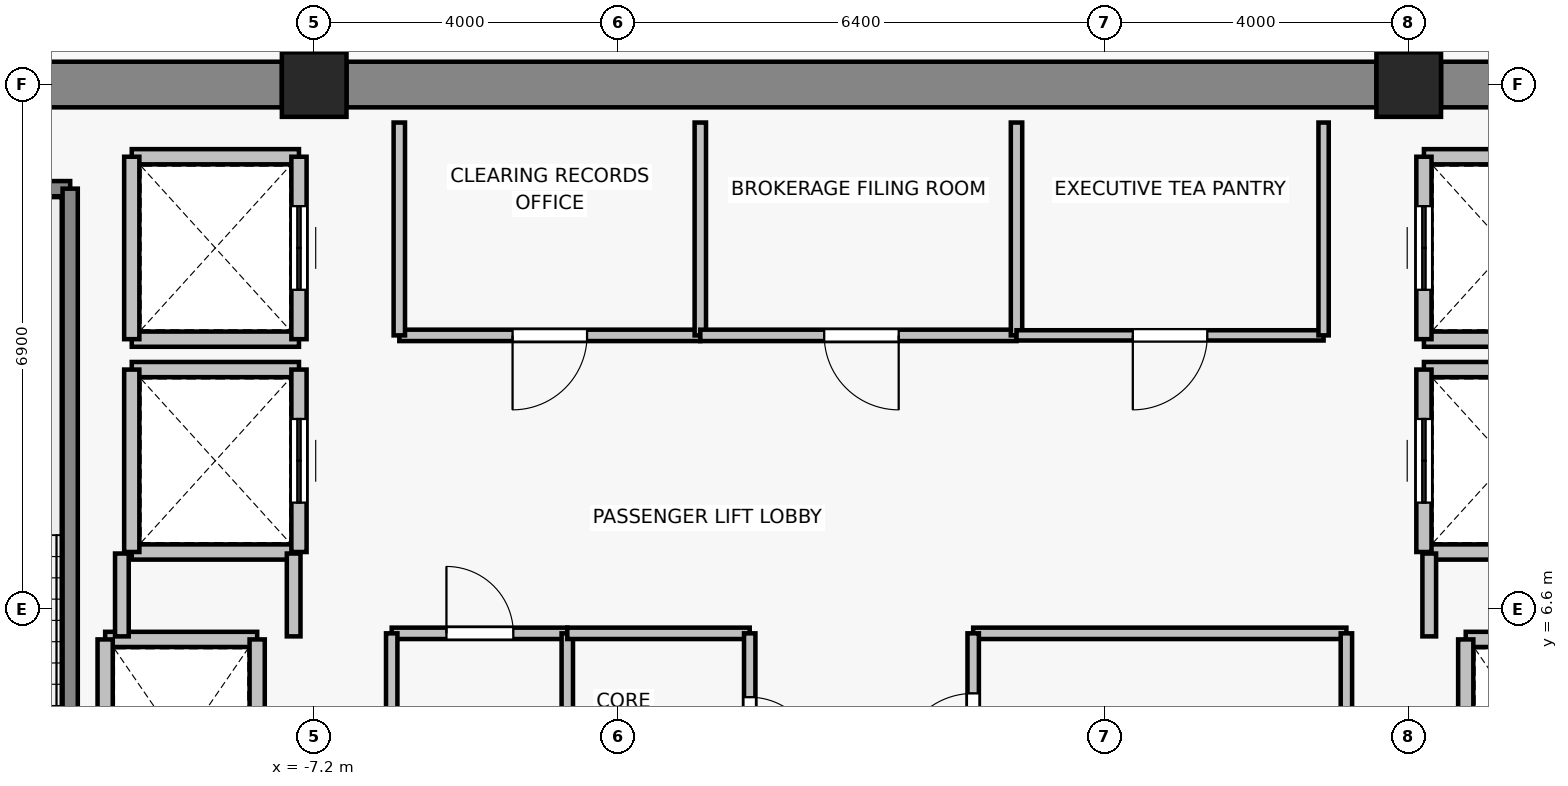
"""IFC4 building model, lengths in metres.
Left out: names, types, materials, properties, quantities, classifications, styles, units other than length and angle.
Written with IfcOpenShell. Run it as: python <this file> out.ifc"""

import sys

from ifc_helpers import new_model, si_unit, direction, frame, frame_2d, origin, origin_2d, place, context, subcontext, project, spatial, rectangle, extrude, source, transform, mapped, element, fill, save


model = new_model("IFC4")
c1 = context("Model", 3, precision=1e-05, world=origin(), true_north=direction((0.0, 1.0)))
c2 = subcontext(c1, "Body", "Model", "MODEL_VIEW")
j1 = project(units=[si_unit("LENGTHUNIT", "METRE"), si_unit("PLANEANGLEUNIT", "RADIAN")], contexts=[c1])
p1 = place(None, origin())
s1 = spatial("IfcSite", under=j1, at=p1, CompositionType="ELEMENT")
p2 = place(p1, origin())
s2 = spatial("IfcBuilding", under=s1, at=p2, CompositionType="ELEMENT")
p3 = place(p2, frame((0.0, 0.0, 261.7)))
s3 = spatial("IfcBuildingStorey", under=s2, at=p3, CompositionType="ELEMENT", Elevation=261.7)
for number, where, z_axis, x_axis in (
    (1, (-7.2, 13.5, 0.0), (0.0, 0.0, 1.0), (1.0, 0.0, 0.0)),
    (2, (7.2, 13.5, 0.0), (0.0, 0.0, 1.0), (1.0, 0.0, 0.0)),
):
    element("IfcColumn", number, at=place(p3, frame(where, z_axis=z_axis, x_axis=x_axis)), inside=s3, PredefinedType="COLUMN", context=c2, shape_type="SweptSolid", body=[
        extrude(rectangle(XDim=0.85, YDim=0.85, at=origin_2d()), origin(), (0.0, 0.0, 1.0), 3.3),
    ])
p4 = place(p3, frame((-13.975, 13.5, 0.0), z_axis=(0.0, 0.0, 1.0), x_axis=(1.0, 0.0, 0.0)))
e3 = element("IfcWall", 3, at=p4, inside=s3, PredefinedType="SHEAR", context=c2, shape_type="SweptSolid", body=[
    extrude(rectangle(XDim=6.35, YDim=0.6, at=frame_2d((3.175, 0.0))), origin(), (0.0, 0.0, 1.0), 3.075),
])
p5 = place(p3, frame((-6.775, 13.5, 0.0), z_axis=(0.0, 0.0, 1.0), x_axis=(1.0, 0.0, 0.0)))
e4 = element("IfcWall", 4, at=p5, inside=s3, PredefinedType="SHEAR", context=c2, shape_type="SweptSolid", body=[
    extrude(rectangle(XDim=13.55, YDim=0.6, at=frame_2d((6.775, 0.0))), origin(), (0.0, 0.0, 1.0), 3.075),
])
p6 = place(p3, frame((7.625, 13.5, 0.0), z_axis=(0.0, 0.0, 1.0), x_axis=(1.0, 0.0, 0.0)))
e5 = element("IfcWall", 5, at=p6, inside=s3, PredefinedType="SHEAR", context=c2, shape_type="SweptSolid", body=[
    extrude(rectangle(XDim=6.35, YDim=0.6, at=frame_2d((3.175, 0.0))), origin(), (0.0, 0.0, 1.0), 3.075),
])
p7 = place(p3, frame((-9.95, 6.2, 0.0), z_axis=(0.0, 0.0, 1.0), x_axis=(1.0, 0.0, 0.0)))
e6 = element("IfcWall", 6, at=p7, inside=s3, PredefinedType="SOLIDWALL", context=c2, shape_type="SweptSolid", body=[
    extrude(rectangle(XDim=2.0, YDim=0.2, at=frame_2d((1.0, 0.0))), origin(), (0.0, 0.0, 1.0), 3.075),
])
for number, where, z_axis, x_axis in (
    (7, (-9.95, 3.4, 0.0), (0.0, 0.0, 1.0), (0.0, 1.0, 0.0)),
    (8, (-7.95, 6.2, 0.0), (0.0, 0.0, 1.0), (0.0, -1.0, 0.0)),
):
    element("IfcWall", number, at=place(p3, frame(where, z_axis=z_axis, x_axis=x_axis)), inside=s3, PredefinedType="SOLIDWALL", context=c2, shape_type="SweptSolid", body=[
        extrude(rectangle(XDim=2.8, YDim=0.2, at=frame_2d((1.4, 0.0))), origin(), (0.0, 0.0, 1.0), 3.075),
    ])
p8 = place(p3, frame((7.95, 6.2, 0.0), z_axis=(0.0, 0.0, 1.0), x_axis=(1.0, 0.0, 0.0)))
e9 = element("IfcWall", 9, at=p8, inside=s3, PredefinedType="SOLIDWALL", context=c2, shape_type="SweptSolid", body=[
    extrude(rectangle(XDim=2.0, YDim=0.2, at=frame_2d((1.0, 0.0))), origin(), (0.0, 0.0, 1.0), 3.075),
])
p9 = place(p3, frame((7.95, 3.4, 0.0), z_axis=(0.0, 0.0, 1.0), x_axis=(0.0, 1.0, 0.0)))
e10 = element("IfcWall", 10, at=p9, inside=s3, PredefinedType="SOLIDWALL", context=c2, shape_type="SweptSolid", body=[
    extrude(rectangle(XDim=2.8, YDim=0.2, at=frame_2d((1.4, 0.0))), origin(), (0.0, 0.0, 1.0), 3.075),
])
for number, where, z_axis, x_axis in (
    (11, (-7.4, 7.35, 0.0), (0.0, 0.0, 1.0), (-1.0, 0.0, 0.0)),
    (12, (-9.6, 9.75, 0.0), (0.0, 0.0, 1.0), (1.0, 0.0, 0.0)),
):
    element("IfcWall", number, at=place(p3, frame(where, z_axis=z_axis, x_axis=x_axis)), inside=s3, PredefinedType="SOLIDWALL", context=c2, shape_type="SweptSolid", body=[
        extrude(rectangle(XDim=2.2, YDim=0.2, at=frame_2d((1.1, 0.0))), origin(), (0.0, 0.0, 1.0), 2.615),
    ])
p10 = place(p3, frame((-9.6, 7.35, 0.0), z_axis=(0.0, 0.0, 1.0), x_axis=(0.0, 1.0, 0.0)))
e13 = element("IfcWall", 13, at=p10, inside=s3, PredefinedType="SOLIDWALL", context=c2, shape_type="SweptSolid", body=[
    extrude(rectangle(XDim=2.4, YDim=0.2, at=frame_2d((1.2, 0.0))), origin(), (0.0, 0.0, 1.0), 3.075),
])
p11 = place(p3, frame((-7.4, 9.75, 0.0), z_axis=(0.0, 0.0, 1.0), x_axis=(0.0, -1.0, 0.0)))
e14 = element("IfcWall", 14, at=p11, inside=s3, PredefinedType="SOLIDWALL", context=c2, shape_type="SweptSolid", body=[
    extrude(rectangle(XDim=2.4, YDim=0.2, at=frame_2d((1.2, 0.0))), origin(), (0.0, 0.0, 1.0), 2.615),
])
p12 = place(p11, frame((0.65, 0.0, 0.0)))
e15 = element("IfcOpeningElement", 15, at=p12, cuts=e14, PredefinedType="OPENING", context=c2, shape_type="SweptSolid", body=[
    extrude(rectangle(XDim=1.1, YDim=2.2, at=frame_2d((0.55, 1.1))), frame((0.0, 0.11, 0.0), z_axis=(0.0, -1.0, 0.0), x_axis=(1.0, 0.0, 0.0)), (0.0, 0.0, 1.0), 0.22),
])
for number, where, z_axis, x_axis in (
    (16, (-7.4, 10.15, 0.0), (0.0, 0.0, 1.0), (-1.0, 0.0, 0.0)),
    (17, (-9.6, 12.55, 0.0), (0.0, 0.0, 1.0), (1.0, 0.0, 0.0)),
):
    element("IfcWall", number, at=place(p3, frame(where, z_axis=z_axis, x_axis=x_axis)), inside=s3, PredefinedType="SOLIDWALL", context=c2, shape_type="SweptSolid", body=[
        extrude(rectangle(XDim=2.2, YDim=0.2, at=frame_2d((1.1, 0.0))), origin(), (0.0, 0.0, 1.0), 2.615),
    ])
p13 = place(p3, frame((-9.6, 10.15, 0.0), z_axis=(0.0, 0.0, 1.0), x_axis=(0.0, 1.0, 0.0)))
e18 = element("IfcWall", 18, at=p13, inside=s3, PredefinedType="SOLIDWALL", context=c2, shape_type="SweptSolid", body=[
    extrude(rectangle(XDim=2.4, YDim=0.2, at=frame_2d((1.2, 0.0))), origin(), (0.0, 0.0, 1.0), 3.075),
])
p14 = place(p3, frame((-7.4, 12.55, 0.0), z_axis=(0.0, 0.0, 1.0), x_axis=(0.0, -1.0, 0.0)))
e19 = element("IfcWall", 19, at=p14, inside=s3, PredefinedType="SOLIDWALL", context=c2, shape_type="SweptSolid", body=[
    extrude(rectangle(XDim=2.4, YDim=0.2, at=frame_2d((1.2, 0.0))), origin(), (0.0, 0.0, 1.0), 2.615),
])
p15 = place(p14, frame((0.65, 0.0, 0.0)))
e20 = element("IfcOpeningElement", 20, at=p15, cuts=e19, PredefinedType="OPENING", context=c2, shape_type="SweptSolid", body=[
    extrude(rectangle(XDim=1.1, YDim=2.2, at=frame_2d((0.55, 1.1))), frame((0.0, 0.11, 0.0), z_axis=(0.0, -1.0, 0.0), x_axis=(1.0, 0.0, 0.0)), (0.0, 0.0, 1.0), 0.22),
])
for number, where, z_axis, x_axis in (
    (21, (9.6, 7.35, 0.0), (0.0, 0.0, 1.0), (-1.0, 0.0, 0.0)),
    (22, (7.4, 9.75, 0.0), (0.0, 0.0, 1.0), (1.0, 0.0, 0.0)),
):
    element("IfcWall", number, at=place(p3, frame(where, z_axis=z_axis, x_axis=x_axis)), inside=s3, PredefinedType="SOLIDWALL", context=c2, shape_type="SweptSolid", body=[
        extrude(rectangle(XDim=2.2, YDim=0.2, at=frame_2d((1.1, 0.0))), origin(), (0.0, 0.0, 1.0), 2.615),
    ])
p16 = place(p3, frame((7.4, 7.35, 0.0), z_axis=(0.0, 0.0, 1.0), x_axis=(0.0, 1.0, 0.0)))
e23 = element("IfcWall", 23, at=p16, inside=s3, PredefinedType="SOLIDWALL", context=c2, shape_type="SweptSolid", body=[
    extrude(rectangle(XDim=2.4, YDim=0.2, at=frame_2d((1.2, 0.0))), origin(), (0.0, 0.0, 1.0), 2.615),
])
p17 = place(p16, frame((0.65, 0.0, 0.0)))
e24 = element("IfcOpeningElement", 24, at=p17, cuts=e23, PredefinedType="OPENING", context=c2, shape_type="SweptSolid", body=[
    extrude(rectangle(XDim=1.1, YDim=2.2, at=frame_2d((0.55, 1.1))), frame((0.0, 0.11, 0.0), z_axis=(0.0, -1.0, 0.0), x_axis=(1.0, 0.0, 0.0)), (0.0, 0.0, 1.0), 0.22),
])
for number, where, z_axis, x_axis in (
    (25, (9.6, 10.15, 0.0), (0.0, 0.0, 1.0), (-1.0, 0.0, 0.0)),
    (26, (7.4, 12.55, 0.0), (0.0, 0.0, 1.0), (1.0, 0.0, 0.0)),
):
    element("IfcWall", number, at=place(p3, frame(where, z_axis=z_axis, x_axis=x_axis)), inside=s3, PredefinedType="SOLIDWALL", context=c2, shape_type="SweptSolid", body=[
        extrude(rectangle(XDim=2.2, YDim=0.2, at=frame_2d((1.1, 0.0))), origin(), (0.0, 0.0, 1.0), 2.615),
    ])
p18 = place(p3, frame((7.4, 10.15, 0.0), z_axis=(0.0, 0.0, 1.0), x_axis=(0.0, 1.0, 0.0)))
e27 = element("IfcWall", 27, at=p18, inside=s3, PredefinedType="SOLIDWALL", context=c2, shape_type="SweptSolid", body=[
    extrude(rectangle(XDim=2.4, YDim=0.2, at=frame_2d((1.2, 0.0))), origin(), (0.0, 0.0, 1.0), 2.615),
])
p19 = place(p18, frame((0.65, 0.0, 0.0)))
e28 = element("IfcOpeningElement", 28, at=p19, cuts=e27, PredefinedType="OPENING", context=c2, shape_type="SweptSolid", body=[
    extrude(rectangle(XDim=1.1, YDim=2.2, at=frame_2d((0.55, 1.1))), frame((0.0, 0.11, 0.0), z_axis=(0.0, -1.0, 0.0), x_axis=(1.0, 0.0, 0.0)), (0.0, 0.0, 1.0), 0.22),
])
p20 = place(p3, frame((-13.93, 12.13, 0.0), z_axis=(0.0, 0.0, 1.0), x_axis=(1.0, 0.0, 0.0)))
e29 = element("IfcWall", 29, at=p20, inside=s3, PredefinedType="SOLIDWALL", context=c2, shape_type="SweptSolid", body=[
    extrude(rectangle(XDim=3.52, YDim=0.2, at=frame_2d((1.76, 0.0))), origin(), (0.0, 0.0, 1.0), 3.075),
])
p21 = place(p3, frame((-10.41, 12.13, 0.0), z_axis=(0.0, 0.0, 1.0), x_axis=(0.0, -1.0, 0.0)))
e30 = element("IfcWall", 30, at=p21, inside=s3, PredefinedType="SOLIDWALL", context=c2, shape_type="SweptSolid", body=[
    extrude(rectangle(XDim=8.84, YDim=0.2, at=frame_2d((4.42, 0.0))), origin(), (0.0, 0.0, 1.0), 3.075),
])
p22 = place(p3, frame((-9.73, 6.24, 0.0), z_axis=(0.0, 0.0, 1.0), x_axis=(0.0, 1.0, 0.0)))
e31 = element("IfcWall", 31, at=p22, inside=s3, PredefinedType="PARTITIONING", context=c2, shape_type="SweptSolid", body=[
    extrude(rectangle(XDim=1.09, YDim=0.18, at=frame_2d((0.545, 0.0))), origin(), (0.0, 0.0, 1.0), 3.075),
])
for number, where, z_axis, x_axis in (
    (32, (-7.47, 7.33, 0.0), (0.0, 0.0, 1.0), (0.0, -1.0, 0.0)),
    (33, (7.47, 6.24, 0.0), (0.0, 0.0, 1.0), (0.0, 1.0, 0.0)),
):
    element("IfcWall", number, at=place(p3, frame(where, z_axis=z_axis, x_axis=x_axis)), inside=s3, PredefinedType="PARTITIONING", context=c2, shape_type="SweptSolid", body=[
        extrude(rectangle(XDim=1.09, YDim=0.18, at=frame_2d((0.545, 0.0))), origin(), (0.0, 0.0, 1.0), 2.615),
    ])
p23 = place(p3, frame((-2.12, 10.2, 0.0), z_axis=(0.0, 0.0, 1.0), x_axis=(-1.0, 0.0, 0.0)))
e34 = element("IfcWall", 34, at=p23, inside=s3, PredefinedType="PARTITIONING", context=c2, shape_type="SweptSolid", body=[
    extrude(rectangle(XDim=3.96, YDim=0.15, at=frame_2d((1.98, 0.0))), origin(), (0.0, 0.0, 1.0), 3.075),
])
p24 = place(p23, frame((1.49, 0.0, 0.0)))
e35 = element("IfcOpeningElement", 35, at=p24, cuts=e34, PredefinedType="OPENING", context=c2, shape_type="SweptSolid", body=[
    extrude(rectangle(XDim=0.98, YDim=2.15, at=frame_2d((0.49, 1.075))), frame((0.0, 0.085, 0.0), z_axis=(0.0, -1.0, 0.0), x_axis=(1.0, 0.0, 0.0)), (0.0, 0.0, 1.0), 0.17),
])
for number, where, z_axis, x_axis in (
    (36, (-6.08, 10.2, 0.0), (0.0, 0.0, 1.0), (0.0, 1.0, 0.0)),
    (37, (-2.12, 13.0, 0.0), (0.0, 0.0, 1.0), (0.0, -1.0, 0.0)),
):
    element("IfcWall", number, at=place(p3, frame(where, z_axis=z_axis, x_axis=x_axis)), inside=s3, PredefinedType="PARTITIONING", context=c2, shape_type="SweptSolid", body=[
        extrude(rectangle(XDim=2.8, YDim=0.15, at=frame_2d((1.4, 0.0))), origin(), (0.0, 0.0, 1.0), 3.075),
    ])
p25 = place(p3, frame((2.04, 10.2, 0.0), z_axis=(0.0, 0.0, 1.0), x_axis=(-1.0, 0.0, 0.0)))
e38 = element("IfcWall", 38, at=p25, inside=s3, PredefinedType="PARTITIONING", context=c2, shape_type="SweptSolid", body=[
    extrude(rectangle(XDim=4.16, YDim=0.15, at=frame_2d((2.08, 0.0))), origin(), (0.0, 0.0, 1.0), 3.075),
])
p26 = place(p25, frame((1.55, 0.0, 0.0)))
e39 = element("IfcOpeningElement", 39, at=p26, cuts=e38, PredefinedType="OPENING", context=c2, shape_type="SweptSolid", body=[
    extrude(rectangle(XDim=0.98, YDim=2.15, at=frame_2d((0.49, 1.075))), frame((0.0, 0.085, 0.0), z_axis=(0.0, -1.0, 0.0), x_axis=(1.0, 0.0, 0.0)), (0.0, 0.0, 1.0), 0.17),
])
p27 = place(p3, frame((2.04, 13.0, 0.0), z_axis=(0.0, 0.0, 1.0), x_axis=(0.0, -1.0, 0.0)))
e40 = element("IfcWall", 40, at=p27, inside=s3, PredefinedType="PARTITIONING", context=c2, shape_type="SweptSolid", body=[
    extrude(rectangle(XDim=2.8, YDim=0.15, at=frame_2d((1.4, 0.0))), origin(), (0.0, 0.0, 1.0), 3.075),
])
p28 = place(p3, frame((6.08, 10.2, 0.0), z_axis=(0.0, 0.0, 1.0), x_axis=(-1.0, 0.0, 0.0)))
e41 = element("IfcWall", 41, at=p28, inside=s3, PredefinedType="PARTITIONING", context=c2, shape_type="SweptSolid", body=[
    extrude(rectangle(XDim=4.04, YDim=0.135, at=frame_2d((2.02, 0.0))), origin(), (0.0, 0.0, 1.0), 3.075),
])
p29 = place(p28, frame((1.53, 0.0, 0.0)))
e42 = element("IfcOpeningElement", 42, at=p29, cuts=e41, PredefinedType="OPENING", context=c2, shape_type="SweptSolid", body=[
    extrude(rectangle(XDim=0.98, YDim=2.15, at=frame_2d((0.49, 1.075))), frame((0.0, 0.077, 0.0), z_axis=(0.0, -1.0, 0.0), x_axis=(1.0, 0.0, 0.0)), (0.0, 0.0, 1.0), 0.155),
])
p30 = place(p3, frame((6.08, 13.0, 0.0), z_axis=(0.0, 0.0, 1.0), x_axis=(0.0, -1.0, 0.0)))
e43 = element("IfcWall", 43, at=p30, inside=s3, PredefinedType="PARTITIONING", context=c2, shape_type="SweptSolid", body=[
    extrude(rectangle(XDim=2.8, YDim=0.135, at=frame_2d((1.4, 0.0))), origin(), (0.0, 0.0, 1.0), 3.075),
])
p31 = place(p3, frame((-6.18, 6.28, 0.0), z_axis=(0.0, 0.0, 1.0), x_axis=(1.0, 0.0, 0.0)))
e44 = element("IfcWall", 44, at=p31, inside=s3, PredefinedType="PARTITIONING", context=c2, shape_type="SweptSolid", body=[
    extrude(rectangle(XDim=2.31, YDim=0.15, at=frame_2d((1.155, 0.0))), origin(), (0.0, 0.0, 1.0), 3.075),
])
p32 = place(p31, frame((0.72, 0.0, 0.0)))
e45 = element("IfcOpeningElement", 45, at=p32, cuts=e44, PredefinedType="OPENING", context=c2, shape_type="SweptSolid", body=[
    extrude(rectangle(XDim=0.88, YDim=2.1, at=frame_2d((0.44, 1.05))), frame((0.0, 0.085, 0.0), z_axis=(0.0, -1.0, 0.0), x_axis=(1.0, 0.0, 0.0)), (0.0, 0.0, 1.0), 0.17),
])
for number, where, z_axis, x_axis in (
    (46, (-6.18, 3.76, 0.0), (0.0, 0.0, 1.0), (0.0, 1.0, 0.0)),
    (47, (-3.87, 6.28, 0.0), (0.0, 0.0, 1.0), (0.0, -1.0, 0.0)),
):
    element("IfcWall", number, at=place(p3, frame(where, z_axis=z_axis, x_axis=x_axis)), inside=s3, PredefinedType="PARTITIONING", context=c2, shape_type="SweptSolid", body=[
        extrude(rectangle(XDim=2.52, YDim=0.15, at=frame_2d((1.26, 0.0))), origin(), (0.0, 0.0, 1.0), 3.075),
    ])
p33 = place(p3, frame((-3.87, 6.28, 0.0), z_axis=(0.0, 0.0, 1.0), x_axis=(1.0, 0.0, 0.0)))
e48 = element("IfcWall", 48, at=p33, inside=s3, PredefinedType="PARTITIONING", context=c2, shape_type="SweptSolid", body=[
    extrude(rectangle(XDim=2.4, YDim=0.15, at=frame_2d((1.2, 0.0))), origin(), (0.0, 0.0, 1.0), 3.075),
])
p34 = place(p3, frame((-1.47, 6.28, 0.0), z_axis=(0.0, 0.0, 1.0), x_axis=(0.0, -1.0, 0.0)))
e49 = element("IfcWall", 49, at=p34, inside=s3, PredefinedType="PARTITIONING", context=c2, shape_type="SweptSolid", body=[
    extrude(rectangle(XDim=2.52, YDim=0.15, at=frame_2d((1.26, 0.0))), origin(), (0.0, 0.0, 1.0), 3.075),
])
p35 = place(p34, frame((0.84, 0.0, 0.0)))
e50 = element("IfcOpeningElement", 50, at=p35, cuts=e49, PredefinedType="OPENING", context=c2, shape_type="SweptSolid", body=[
    extrude(rectangle(XDim=0.88, YDim=2.1, at=frame_2d((0.44, 1.05))), frame((0.0, 0.085, 0.0), z_axis=(0.0, -1.0, 0.0), x_axis=(1.0, 0.0, 0.0)), (0.0, 0.0, 1.0), 0.17),
])
p36 = place(p3, frame((1.47, 6.28, 0.0), z_axis=(0.0, 0.0, 1.0), x_axis=(1.0, 0.0, 0.0)))
e51 = element("IfcWall", 51, at=p36, inside=s3, PredefinedType="PARTITIONING", context=c2, shape_type="SweptSolid", body=[
    extrude(rectangle(XDim=4.91, YDim=0.15, at=frame_2d((2.455, 0.0))), origin(), (0.0, 0.0, 1.0), 3.075),
])
p37 = place(p3, frame((1.47, 3.76, 0.0), z_axis=(0.0, 0.0, 1.0), x_axis=(0.0, 1.0, 0.0)))
e52 = element("IfcWall", 52, at=p37, inside=s3, PredefinedType="PARTITIONING", context=c2, shape_type="SweptSolid", body=[
    extrude(rectangle(XDim=2.52, YDim=0.15, at=frame_2d((1.26, 0.0))), origin(), (0.0, 0.0, 1.0), 3.075),
])
p38 = place(p37, frame((0.75, 0.0, 0.0)))
e53 = element("IfcOpeningElement", 53, at=p38, cuts=e52, PredefinedType="OPENING", context=c2, shape_type="SweptSolid", body=[
    extrude(rectangle(XDim=0.98, YDim=2.15, at=frame_2d((0.49, 1.075))), frame((0.0, 0.085, 0.0), z_axis=(0.0, -1.0, 0.0), x_axis=(1.0, 0.0, 0.0)), (0.0, 0.0, 1.0), 0.17),
])
p39 = place(p3, frame((6.38, 6.28, 0.0), z_axis=(0.0, 0.0, 1.0), x_axis=(0.0, -1.0, 0.0)))
e54 = element("IfcWall", 54, at=p39, inside=s3, PredefinedType="PARTITIONING", context=c2, shape_type="SweptSolid", body=[
    extrude(rectangle(XDim=2.52, YDim=0.15, at=frame_2d((1.26, 0.0))), origin(), (0.0, 0.0, 1.0), 3.075),
])
m1 = source(origin(), c2, "Body", "SweptSolid", [
    extrude(rectangle(XDim=1.1, YDim=2.2, at=frame_2d((0.55, 1.1))), frame((0.0, 0.025, 0.0), z_axis=(0.0, -1.0, 0.0), x_axis=(1.0, 0.0, 0.0)), (0.0, 0.0, 1.0), 0.05),
])
p40 = place(p12, origin())
e55 = element("IfcDoor", 55, at=p40, inside=s3, OperationType="DOUBLE_DOOR_SLIDING", PredefinedType="DOOR", context=c2, shape_type="MappedRepresentation", body=[
    mapped(m1, transform((0.0, 0.0, 0.0), x_axis=(1.0, 0.0, 0.0), y_axis=(0.0, 1.0, 0.0), z_axis=(0.0, 0.0, 1.0), scale=1.0)),
])
fill(e15, e55)
p41 = place(p15, origin())
e56 = element("IfcDoor", 56, at=p41, inside=s3, OperationType="DOUBLE_DOOR_SLIDING", PredefinedType="DOOR", context=c2, shape_type="MappedRepresentation", body=[
    mapped(m1, transform((0.0, 0.0, 0.0), x_axis=(1.0, 0.0, 0.0), y_axis=(0.0, 1.0, 0.0), z_axis=(0.0, 0.0, 1.0), scale=1.0)),
])
fill(e20, e56)
p42 = place(p17, origin())
e57 = element("IfcDoor", 57, at=p42, inside=s3, OperationType="DOUBLE_DOOR_SLIDING", PredefinedType="DOOR", context=c2, shape_type="MappedRepresentation", body=[
    mapped(m1, transform((0.0, 0.0, 0.0), x_axis=(1.0, 0.0, 0.0), y_axis=(0.0, 1.0, 0.0), z_axis=(0.0, 0.0, 1.0), scale=1.0)),
])
fill(e24, e57)
p43 = place(p19, origin())
e58 = element("IfcDoor", 58, at=p43, inside=s3, OperationType="DOUBLE_DOOR_SLIDING", PredefinedType="DOOR", context=c2, shape_type="MappedRepresentation", body=[
    mapped(m1, transform((0.0, 0.0, 0.0), x_axis=(1.0, 0.0, 0.0), y_axis=(0.0, 1.0, 0.0), z_axis=(0.0, 0.0, 1.0), scale=1.0)),
])
fill(e28, e58)
m2 = source(origin(), c2, "Body", "SweptSolid", [
    extrude(rectangle(XDim=0.98, YDim=2.15, at=frame_2d((0.49, 1.075))), frame((0.0, 0.025, 0.0), z_axis=(0.0, -1.0, 0.0), x_axis=(1.0, 0.0, 0.0)), (0.0, 0.0, 1.0), 0.05),
])
p44 = place(p24, origin())
e59 = element("IfcDoor", 59, at=p44, inside=s3, OperationType="SINGLE_SWING_RIGHT", PredefinedType="DOOR", context=c2, shape_type="MappedRepresentation", body=[
    mapped(m2, transform((0.0, 0.0, 0.0), x_axis=(1.0, 0.0, 0.0), y_axis=(0.0, 1.0, 0.0), z_axis=(0.0, 0.0, 1.0), scale=1.0)),
])
fill(e35, e59)
p45 = place(p26, origin())
e60 = element("IfcDoor", 60, at=p45, inside=s3, OperationType="SINGLE_SWING_LEFT", PredefinedType="DOOR", context=c2, shape_type="MappedRepresentation", body=[
    mapped(m2, transform((0.0, 0.0, 0.0), x_axis=(1.0, 0.0, 0.0), y_axis=(0.0, 1.0, 0.0), z_axis=(0.0, 0.0, 1.0), scale=1.0)),
])
fill(e39, e60)
p46 = place(p29, origin())
e61 = element("IfcDoor", 61, at=p46, inside=s3, OperationType="SINGLE_SWING_RIGHT", PredefinedType="DOOR", context=c2, shape_type="MappedRepresentation", body=[
    mapped(m2, transform((0.0, 0.0, 0.0), x_axis=(1.0, 0.0, 0.0), y_axis=(0.0, 1.0, 0.0), z_axis=(0.0, 0.0, 1.0), scale=1.0)),
])
fill(e42, e61)
m3 = source(origin(), c2, "Body", "SweptSolid", [
    extrude(rectangle(XDim=0.88, YDim=2.1, at=frame_2d((0.44, 1.05))), frame((0.0, 0.025, 0.0), z_axis=(0.0, -1.0, 0.0), x_axis=(1.0, 0.0, 0.0)), (0.0, 0.0, 1.0), 0.05),
])
p47 = place(p32, origin())
e62 = element("IfcDoor", 62, at=p47, inside=s3, OperationType="SINGLE_SWING_LEFT", PredefinedType="DOOR", context=c2, shape_type="MappedRepresentation", body=[
    mapped(m3, transform((0.0, 0.0, 0.0), x_axis=(1.0, 0.0, 0.0), y_axis=(0.0, 1.0, 0.0), z_axis=(0.0, 0.0, 1.0), scale=1.0)),
])
fill(e45, e62)
p48 = place(p35, origin())
e63 = element("IfcDoor", 63, at=p48, inside=s3, OperationType="SINGLE_SWING_RIGHT", PredefinedType="DOOR", context=c2, shape_type="MappedRepresentation", body=[
    mapped(m3, transform((0.0, 0.0, 0.0), x_axis=(1.0, 0.0, 0.0), y_axis=(0.0, 1.0, 0.0), z_axis=(0.0, 0.0, 1.0), scale=1.0)),
])
fill(e50, e63)
p49 = place(p38, origin())
e64 = element("IfcDoor", 64, at=p49, inside=s3, OperationType="SINGLE_SWING_LEFT", PredefinedType="DOOR", context=c2, shape_type="MappedRepresentation", body=[
    mapped(m2, transform((0.0, 0.0, 0.0), x_axis=(1.0, 0.0, 0.0), y_axis=(0.0, 1.0, 0.0), z_axis=(0.0, 0.0, 1.0), scale=1.0)),
])
fill(e53, e64)
save(model, sys.argv[1])
